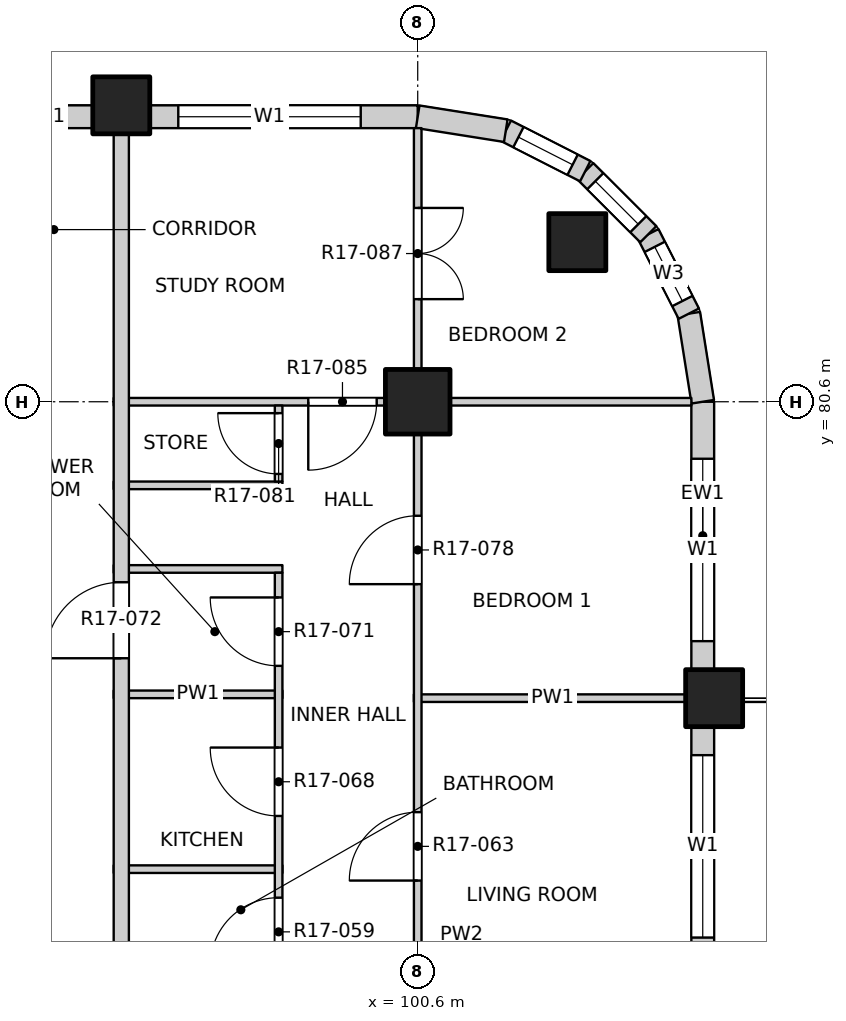
"""IFC4 building model, lengths in metres.
Left out: names, types, materials, properties, quantities, classifications, styles, units other than length and angle.
Written with IfcOpenShell. Run it as: python <this file> out.ifc"""

import sys

from ifc_helpers import new_model, si_unit, direction, frame, frame_2d, origin, origin_2d, place, context, subcontext, project, spatial, rectangle, extrude, element, fill, save


model = new_model("IFC4")
c1 = context("Model", 3, precision=1e-05, world=origin(), true_north=direction((0.0, 1.0)))
c2 = subcontext(c1, "Body", "Model", "MODEL_VIEW")
j1 = project(units=[si_unit("LENGTHUNIT", "METRE"), si_unit("PLANEANGLEUNIT", "RADIAN")], contexts=[c1])
p1 = place(None, origin())
s1 = spatial("IfcSite", under=j1, at=p1, CompositionType="ELEMENT")
p2 = place(p1, origin())
s2 = spatial("IfcBuilding", under=s1, at=p2, CompositionType="ELEMENT")
p3 = place(p2, frame((0.0, 0.0, 179.2)))
s3 = spatial("IfcBuildingStorey", under=s2, at=p3, CompositionType="ELEMENT", Elevation=179.2)
for number, where, z_axis, x_axis in (
    (1, (102.7, 82.7, -0.3), (0.0, 0.0, 1.0), (1.0, 0.0, 0.0)),
    (2, (104.5, 76.7, -0.3), (0.0, 0.0, 1.0), (1.0, 0.0, 0.0)),
    (3, (96.7, 84.5, -0.3), (0.0, 0.0, 1.0), (1.0, 0.0, 0.0)),
):
    element("IfcColumn", number, at=place(p3, frame(where, z_axis=z_axis, x_axis=x_axis)), inside=s3, PredefinedType="COLUMN", context=c2, shape_type="SweptSolid", body=[
        extrude(rectangle(XDim=0.75, YDim=0.75, at=origin_2d()), origin(), (0.0, 0.0, 1.0), 3.45),
    ])
p4 = place(p3, frame((100.6, 80.6, -0.3), z_axis=(0.0, 0.0, 1.0), x_axis=(1.0, 0.0, 0.0)))
e4 = element("IfcColumn", 4, at=p4, inside=s3, PredefinedType="COLUMN", context=c2, shape_type="SweptSolid", body=[
    extrude(rectangle(XDim=0.85, YDim=0.85, at=origin_2d()), origin(), (0.0, 0.0, 1.0), 3.45),
])
p5 = place(p3, frame((104.35, 69.275, 0.0), z_axis=(0.0, 0.0, 1.0), x_axis=(0.0, 1.0, 0.0)))
e5 = element("IfcWall", 5, at=p5, inside=s3, PredefinedType="SOLIDWALL", context=c2, shape_type="SweptSolid", body=[
    extrude(rectangle(XDim=7.05, YDim=0.3, at=frame_2d((3.525, 0.0))), origin(), (0.0, 0.0, 1.0), 2.7),
])
p6 = place(p5, frame((0.675, 0.0, 0.0)))
e6 = element("IfcOpeningElement", 6, at=p6, cuts=e5, PredefinedType="OPENING", context=c2, shape_type="SweptSolid", body=[
    extrude(rectangle(XDim=1.8, YDim=2.4, at=frame_2d((0.9, 1.2))), frame((0.0, 0.16, 0.0), z_axis=(0.0, -1.0, 0.0), x_axis=(1.0, 0.0, 0.0)), (0.0, 0.0, 1.0), 0.32),
])
p7 = place(p5, frame((4.275, 0.0, 0.9)))
e7 = element("IfcOpeningElement", 7, at=p7, cuts=e5, PredefinedType="OPENING", context=c2, shape_type="SweptSolid", body=[
    extrude(rectangle(XDim=2.4, YDim=1.8, at=frame_2d((1.2, 0.9))), frame((0.0, 0.16, 0.0), z_axis=(0.0, -1.0, 0.0), x_axis=(1.0, 0.0, 0.0)), (0.0, 0.0, 1.0), 0.32),
])
p8 = place(p3, frame((104.35, 77.075, 0.0), z_axis=(0.0, 0.0, 1.0), x_axis=(0.0, 1.0, 0.0)))
e8 = element("IfcWall", 8, at=p8, inside=s3, PredefinedType="SOLIDWALL", context=c2, shape_type="SweptSolid", body=[
    extrude(rectangle(XDim=3.525, YDim=0.3, at=frame_2d((1.763, 0.0))), origin(), (0.0, 0.0, 1.0), 2.7),
])
p9 = place(p8, frame((0.375, 0.0, 0.9)))
e9 = element("IfcOpeningElement", 9, at=p9, cuts=e8, PredefinedType="OPENING", context=c2, shape_type="SweptSolid", body=[
    extrude(rectangle(XDim=2.4, YDim=1.8, at=frame_2d((1.2, 0.9))), frame((0.0, 0.16, 0.0), z_axis=(0.0, -1.0, 0.0), x_axis=(1.0, 0.0, 0.0)), (0.0, 0.0, 1.0), 0.32),
])
p10 = place(p3, frame((95.025, 84.35, 0.0), z_axis=(0.0, 0.0, 1.0), x_axis=(1.0, 0.0, 0.0)))
e10 = element("IfcWall", 10, at=p10, inside=s3, PredefinedType="SOLIDWALL", context=c2, shape_type="SweptSolid", body=[
    extrude(rectangle(XDim=1.3, YDim=0.3, at=frame_2d((0.65, 0.0))), origin(), (0.0, 0.0, 1.0), 2.7),
])
p11 = place(p3, frame((97.075, 84.35, 0.0), z_axis=(0.0, 0.0, 1.0), x_axis=(1.0, 0.0, 0.0)))
e11 = element("IfcWall", 11, at=p11, inside=s3, PredefinedType="SOLIDWALL", context=c2, shape_type="SweptSolid", body=[
    extrude(rectangle(XDim=3.525, YDim=0.3, at=frame_2d((1.763, 0.0))), origin(), (0.0, 0.0, 1.0), 2.7),
])
p12 = place(p11, frame((0.375, 0.0, 0.9)))
e12 = element("IfcOpeningElement", 12, at=p12, cuts=e11, PredefinedType="OPENING", context=c2, shape_type="SweptSolid", body=[
    extrude(rectangle(XDim=2.4, YDim=1.8, at=frame_2d((1.2, 0.9))), frame((0.0, 0.16, 0.0), z_axis=(0.0, -1.0, 0.0), x_axis=(1.0, 0.0, 0.0)), (0.0, 0.0, 1.0), 0.32),
])
p13 = place(p3, frame((104.35, 80.6, 0.0), z_axis=(0.0, 0.0, 1.0), x_axis=(-0.156496880861, 0.987678452879, 0.0)))
e13 = element("IfcWall", 13, at=p13, inside=s3, PredefinedType="SOLIDWALL", context=c2, shape_type="SweptSolid", body=[
    extrude(rectangle(XDim=1.173, YDim=0.3, at=frame_2d((0.586, 0.0))), origin(), (0.0, 0.0, 1.0), 2.7),
])
p14 = place(p3, frame((104.167, 81.759, 0.0), z_axis=(0.0, 0.0, 1.0), x_axis=(-0.454025524128, 0.890988677504, 0.0)))
e14 = element("IfcWall", 14, at=p14, inside=s3, PredefinedType="SOLIDWALL", context=c2, shape_type="SweptSolid", body=[
    extrude(rectangle(XDim=1.173, YDim=0.3, at=frame_2d((0.587, 0.0))), origin(), (0.0, 0.0, 1.0), 2.7),
])
p15 = place(p14, frame((0.187, 0.0, 0.9)))
e15 = element("IfcOpeningElement", 15, at=p15, cuts=e14, PredefinedType="OPENING", context=c2, shape_type="SweptSolid", body=[
    extrude(rectangle(XDim=0.8, YDim=1.2, at=frame_2d((0.4, 0.6))), frame((0.0, 0.16, 0.0), z_axis=(0.0, -1.0, 0.0), x_axis=(1.0, 0.0, 0.0)), (0.0, 0.0, 1.0), 0.32),
])
p16 = place(p3, frame((103.634, 82.804, 0.0), z_axis=(0.0, 0.0, 1.0), x_axis=(-0.707106781187, 0.707106781187, 0.0)))
e16 = element("IfcWall", 16, at=p16, inside=s3, PredefinedType="SOLIDWALL", context=c2, shape_type="SweptSolid", body=[
    extrude(rectangle(XDim=1.173, YDim=0.3, at=frame_2d((0.586, 0.0))), origin(), (0.0, 0.0, 1.0), 2.7),
])
p17 = place(p16, frame((0.187, 0.0, 0.9)))
e17 = element("IfcOpeningElement", 17, at=p17, cuts=e16, PredefinedType="OPENING", context=c2, shape_type="SweptSolid", body=[
    extrude(rectangle(XDim=0.8, YDim=1.2, at=frame_2d((0.4, 0.6))), frame((0.0, 0.16, 0.0), z_axis=(0.0, -1.0, 0.0), x_axis=(1.0, 0.0, 0.0)), (0.0, 0.0, 1.0), 0.32),
])
p18 = place(p3, frame((102.804, 83.634, 0.0), z_axis=(0.0, 0.0, 1.0), x_axis=(-0.890988677504, 0.454025524128, 0.0)))
e18 = element("IfcWall", 18, at=p18, inside=s3, PredefinedType="SOLIDWALL", context=c2, shape_type="SweptSolid", body=[
    extrude(rectangle(XDim=1.173, YDim=0.3, at=frame_2d((0.587, 0.0))), origin(), (0.0, 0.0, 1.0), 2.7),
])
p19 = place(p18, frame((0.187, 0.0, 0.9)))
e19 = element("IfcOpeningElement", 19, at=p19, cuts=e18, PredefinedType="OPENING", context=c2, shape_type="SweptSolid", body=[
    extrude(rectangle(XDim=0.8, YDim=1.2, at=frame_2d((0.4, 0.6))), frame((0.0, 0.16, 0.0), z_axis=(0.0, -1.0, 0.0), x_axis=(1.0, 0.0, 0.0)), (0.0, 0.0, 1.0), 0.32),
])
p20 = place(p3, frame((101.759, 84.167, 0.0), z_axis=(0.0, 0.0, 1.0), x_axis=(-0.987678452879, 0.156496880861, 0.0)))
e20 = element("IfcWall", 20, at=p20, inside=s3, PredefinedType="SOLIDWALL", context=c2, shape_type="SweptSolid", body=[
    extrude(rectangle(XDim=1.173, YDim=0.3, at=frame_2d((0.586, 0.0))), origin(), (0.0, 0.0, 1.0), 2.7),
])
p21 = place(p3, frame((96.6, 74.45, 0.0), z_axis=(0.0, 0.0, 1.0), x_axis=(1.0, 0.0, 0.0)))
e21 = element("IfcWall", 21, at=p21, inside=s3, PredefinedType="PARTITIONING", context=c2, shape_type="SweptSolid", body=[
    extrude(rectangle(XDim=2.22, YDim=0.1, at=frame_2d((1.11, 0.0))), origin(), (0.0, 0.0, 1.0), 3.15),
])
p22 = place(p3, frame((100.55, 76.7, 0.0), z_axis=(0.0, 0.0, 1.0), x_axis=(1.0, 0.0, 0.0)))
e22 = element("IfcWall", 22, at=p22, inside=s3, PredefinedType="PARTITIONING", context=c2, shape_type="SweptSolid", body=[
    extrude(rectangle(XDim=3.65, YDim=0.1, at=frame_2d((1.825, 0.0))), origin(), (0.0, 0.0, 1.0), 2.55),
])
p23 = place(p3, frame((96.6, 76.75, 0.0), z_axis=(0.0, 0.0, 1.0), x_axis=(1.0, 0.0, 0.0)))
e23 = element("IfcWall", 23, at=p23, inside=s3, PredefinedType="PARTITIONING", context=c2, shape_type="SweptSolid", body=[
    extrude(rectangle(XDim=2.22, YDim=0.1, at=frame_2d((1.11, 0.0))), origin(), (0.0, 0.0, 1.0), 2.55),
])
for number, where, z_axis, x_axis in (
    (24, (96.6, 78.4, 0.0), (0.0, 0.0, 1.0), (1.0, 0.0, 0.0)),
    (25, (96.6, 79.5, 0.0), (0.0, 0.0, 1.0), (1.0, 0.0, 0.0)),
):
    element("IfcWall", number, at=place(p3, frame(where, z_axis=z_axis, x_axis=x_axis)), inside=s3, PredefinedType="PARTITIONING", context=c2, shape_type="SweptSolid", body=[
        extrude(rectangle(XDim=2.22, YDim=0.1, at=frame_2d((1.11, 0.0))), origin(), (0.0, 0.0, 1.0), 3.15),
    ])
p24 = place(p3, frame((96.6, 80.6, 0.0), z_axis=(0.0, 0.0, 1.0), x_axis=(1.0, 0.0, 0.0)))
e26 = element("IfcWall", 26, at=p24, inside=s3, PredefinedType="PARTITIONING", context=c2, shape_type="SweptSolid", body=[
    extrude(rectangle(XDim=7.6, YDim=0.1, at=frame_2d((3.8, 0.0))), origin(), (0.0, 0.0, 1.0), 3.15),
])
p25 = place(p24, frame((2.56, 0.0, 0.0)))
e27 = element("IfcOpeningElement", 27, at=p25, cuts=e26, PredefinedType="OPENING", context=c2, shape_type="SweptSolid", body=[
    extrude(rectangle(XDim=0.9, YDim=2.1, at=frame_2d((0.45, 1.05))), frame((0.0, 0.06, 0.0), z_axis=(0.0, -1.0, 0.0), x_axis=(1.0, 0.0, 0.0)), (0.0, 0.0, 1.0), 0.12),
])
p26 = place(p3, frame((96.7, 49.5, 0.0), z_axis=(0.0, 0.0, 1.0), x_axis=(0.0, 1.0, 0.0)))
e28 = element("IfcWall", 28, at=p26, inside=s3, PredefinedType="PARTITIONING", context=c2, shape_type="SweptSolid", body=[
    extrude(rectangle(XDim=34.7, YDim=0.2, at=frame_2d((17.35, 0.0))), origin(), (0.0, 0.0, 1.0), 3.15),
])
p27 = place(p26, frame((6.875, 0.0, 0.0)))
e29 = element("IfcOpeningElement", 29, at=p27, cuts=e28, PredefinedType="OPENING", context=c2, shape_type="SweptSolid", body=[
    extrude(rectangle(XDim=1.0, YDim=2.1, at=frame_2d((0.5, 1.05))), frame((0.0, 0.11, 0.0), z_axis=(0.0, -1.0, 0.0), x_axis=(1.0, 0.0, 0.0)), (0.0, 0.0, 1.0), 0.22),
])
p28 = place(p26, frame((21.775, 0.0, 0.0)))
e30 = element("IfcOpeningElement", 30, at=p28, cuts=e28, PredefinedType="OPENING", context=c2, shape_type="SweptSolid", body=[
    extrude(rectangle(XDim=1.0, YDim=2.1, at=frame_2d((0.5, 1.05))), frame((0.0, 0.11, 0.0), z_axis=(0.0, -1.0, 0.0), x_axis=(1.0, 0.0, 0.0)), (0.0, 0.0, 1.0), 0.22),
])
p29 = place(p26, frame((27.725, 0.0, 0.0)))
e31 = element("IfcOpeningElement", 31, at=p29, cuts=e28, PredefinedType="OPENING", context=c2, shape_type="SweptSolid", body=[
    extrude(rectangle(XDim=1.0, YDim=2.1, at=frame_2d((0.5, 1.05))), frame((0.0, 0.11, 0.0), z_axis=(0.0, -1.0, 0.0), x_axis=(1.0, 0.0, 0.0)), (0.0, 0.0, 1.0), 0.22),
])
p30 = place(p3, frame((98.77, 71.15, 0.0), z_axis=(0.0, 0.0, 1.0), x_axis=(0.0, 1.0, 0.0)))
e32 = element("IfcWall", 32, at=p30, inside=s3, PredefinedType="PARTITIONING", context=c2, shape_type="SweptSolid", body=[
    extrude(rectangle(XDim=7.2, YDim=0.1, at=frame_2d((3.6, 0.0))), origin(), (0.0, 0.0, 1.0), 3.15),
])
p31 = place(p30, frame((0.4, 0.0, 0.0)))
e33 = element("IfcOpeningElement", 33, at=p31, cuts=e32, PredefinedType="OPENING", context=c2, shape_type="SweptSolid", body=[
    extrude(rectangle(XDim=0.8, YDim=2.1, at=frame_2d((0.4, 1.05))), frame((0.0, 0.06, 0.0), z_axis=(0.0, -1.0, 0.0), x_axis=(1.0, 0.0, 0.0)), (0.0, 0.0, 1.0), 0.12),
])
p32 = place(p30, frame((2.025, 0.0, 0.0)))
e34 = element("IfcOpeningElement", 34, at=p32, cuts=e32, PredefinedType="OPENING", context=c2, shape_type="SweptSolid", body=[
    extrude(rectangle(XDim=0.9, YDim=2.1, at=frame_2d((0.45, 1.05))), frame((0.0, 0.06, 0.0), z_axis=(0.0, -1.0, 0.0), x_axis=(1.0, 0.0, 0.0)), (0.0, 0.0, 1.0), 0.12),
])
p33 = place(p30, frame((4.0, 0.0, 0.0)))
e35 = element("IfcOpeningElement", 35, at=p33, cuts=e32, PredefinedType="OPENING", context=c2, shape_type="SweptSolid", body=[
    extrude(rectangle(XDim=0.9, YDim=2.1, at=frame_2d((0.45, 1.05))), frame((0.0, 0.06, 0.0), z_axis=(0.0, -1.0, 0.0), x_axis=(1.0, 0.0, 0.0)), (0.0, 0.0, 1.0), 0.12),
])
p34 = place(p30, frame((5.975, 0.0, 0.0)))
e36 = element("IfcOpeningElement", 36, at=p34, cuts=e32, PredefinedType="OPENING", context=c2, shape_type="SweptSolid", body=[
    extrude(rectangle(XDim=0.9, YDim=2.1, at=frame_2d((0.45, 1.05))), frame((0.0, 0.06, 0.0), z_axis=(0.0, -1.0, 0.0), x_axis=(1.0, 0.0, 0.0)), (0.0, 0.0, 1.0), 0.12),
])
p35 = place(p3, frame((98.77, 79.55, 0.0), z_axis=(0.0, 0.0, 1.0), x_axis=(0.0, 1.0, 0.0)))
e37 = element("IfcWall", 37, at=p35, inside=s3, PredefinedType="PARTITIONING", context=c2, shape_type="SweptSolid", body=[
    extrude(rectangle(XDim=1.0, YDim=0.1, at=frame_2d((0.5, 0.0))), origin(), (0.0, 0.0, 1.0), 3.15),
])
p36 = place(p35, frame((0.1, 0.0, 0.0)))
e38 = element("IfcOpeningElement", 38, at=p36, cuts=e37, PredefinedType="OPENING", context=c2, shape_type="SweptSolid", body=[
    extrude(rectangle(XDim=0.8, YDim=2.1, at=frame_2d((0.4, 1.05))), frame((0.0, 0.06, 0.0), z_axis=(0.0, -1.0, 0.0), x_axis=(1.0, 0.0, 0.0)), (0.0, 0.0, 1.0), 0.12),
])
p37 = place(p3, frame((100.6, 45.8, 0.0), z_axis=(0.0, 0.0, 1.0), x_axis=(0.0, 1.0, 0.0)))
e39 = element("IfcWall", 39, at=p37, inside=s3, PredefinedType="PARTITIONING", context=c2, shape_type="SweptSolid", body=[
    extrude(rectangle(XDim=38.4, YDim=0.1, at=frame_2d((19.2, 0.0))), origin(), (0.0, 0.0, 1.0), 3.15),
])
p38 = place(p37, frame((1.05, 0.0, 0.0)))
e40 = element("IfcOpeningElement", 40, at=p38, cuts=e39, PredefinedType="OPENING", context=c2, shape_type="SweptSolid", body=[
    extrude(rectangle(XDim=1.2, YDim=2.1, at=frame_2d((0.6, 1.05))), frame((0.0, 0.06, 0.0), z_axis=(0.0, -1.0, 0.0), x_axis=(1.0, 0.0, 0.0)), (0.0, 0.0, 1.0), 0.12),
])
p39 = place(p37, frame((5.1, 0.0, 0.0)))
e41 = element("IfcOpeningElement", 41, at=p39, cuts=e39, PredefinedType="OPENING", context=c2, shape_type="SweptSolid", body=[
    extrude(rectangle(XDim=0.9, YDim=2.1, at=frame_2d((0.45, 1.05))), frame((0.0, 0.06, 0.0), z_axis=(0.0, -1.0, 0.0), x_axis=(1.0, 0.0, 0.0)), (0.0, 0.0, 1.0), 0.12),
])
p40 = place(p37, frame((9.0, 0.0, 0.0)))
e42 = element("IfcOpeningElement", 42, at=p40, cuts=e39, PredefinedType="OPENING", context=c2, shape_type="SweptSolid", body=[
    extrude(rectangle(XDim=0.9, YDim=2.1, at=frame_2d((0.45, 1.05))), frame((0.0, 0.06, 0.0), z_axis=(0.0, -1.0, 0.0), x_axis=(1.0, 0.0, 0.0)), (0.0, 0.0, 1.0), 0.12),
])
p41 = place(p37, frame((12.9, 0.0, 0.0)))
e43 = element("IfcOpeningElement", 43, at=p41, cuts=e39, PredefinedType="OPENING", context=c2, shape_type="SweptSolid", body=[
    extrude(rectangle(XDim=0.9, YDim=2.1, at=frame_2d((0.45, 1.05))), frame((0.0, 0.06, 0.0), z_axis=(0.0, -1.0, 0.0), x_axis=(1.0, 0.0, 0.0)), (0.0, 0.0, 1.0), 0.12),
])
p42 = place(p37, frame((19.725, 0.0, 0.0)))
e44 = element("IfcOpeningElement", 44, at=p42, cuts=e39, PredefinedType="OPENING", context=c2, shape_type="SweptSolid", body=[
    extrude(rectangle(XDim=1.2, YDim=2.1, at=frame_2d((0.6, 1.05))), frame((0.0, 0.06, 0.0), z_axis=(0.0, -1.0, 0.0), x_axis=(1.0, 0.0, 0.0)), (0.0, 0.0, 1.0), 0.12),
])
p43 = place(p37, frame((24.6, 0.0, 0.0)))
e45 = element("IfcOpeningElement", 45, at=p43, cuts=e39, PredefinedType="OPENING", context=c2, shape_type="SweptSolid", body=[
    extrude(rectangle(XDim=0.9, YDim=2.1, at=frame_2d((0.45, 1.05))), frame((0.0, 0.06, 0.0), z_axis=(0.0, -1.0, 0.0), x_axis=(1.0, 0.0, 0.0)), (0.0, 0.0, 1.0), 0.12),
])
p44 = place(p37, frame((28.5, 0.0, 0.0)))
e46 = element("IfcOpeningElement", 46, at=p44, cuts=e39, PredefinedType="OPENING", context=c2, shape_type="SweptSolid", body=[
    extrude(rectangle(XDim=0.9, YDim=2.1, at=frame_2d((0.45, 1.05))), frame((0.0, 0.06, 0.0), z_axis=(0.0, -1.0, 0.0), x_axis=(1.0, 0.0, 0.0)), (0.0, 0.0, 1.0), 0.12),
])
p45 = place(p37, frame((32.4, 0.0, 0.0)))
e47 = element("IfcOpeningElement", 47, at=p45, cuts=e39, PredefinedType="OPENING", context=c2, shape_type="SweptSolid", body=[
    extrude(rectangle(XDim=0.9, YDim=2.1, at=frame_2d((0.45, 1.05))), frame((0.0, 0.06, 0.0), z_axis=(0.0, -1.0, 0.0), x_axis=(1.0, 0.0, 0.0)), (0.0, 0.0, 1.0), 0.12),
])
p46 = place(p37, frame((36.15, 0.0, 0.0)))
e48 = element("IfcOpeningElement", 48, at=p46, cuts=e39, PredefinedType="OPENING", context=c2, shape_type="SweptSolid", body=[
    extrude(rectangle(XDim=1.2, YDim=2.1, at=frame_2d((0.6, 1.05))), frame((0.0, 0.06, 0.0), z_axis=(0.0, -1.0, 0.0), x_axis=(1.0, 0.0, 0.0)), (0.0, 0.0, 1.0), 0.12),
])
p47 = place(p7, origin())
e49 = element("IfcWindow", 49, at=p47, inside=s3, PartitioningType="DOUBLE_PANEL_VERTICAL", PredefinedType="WINDOW", context=c2, shape_type="SweptSolid", body=[
    extrude(rectangle(XDim=2.4, YDim=1.8, at=frame_2d((1.2, 0.9))), frame((0.0, 0.03, 0.0), z_axis=(0.0, -1.0, 0.0), x_axis=(1.0, 0.0, 0.0)), (0.0, 0.0, 1.0), 0.06),
])
fill(e7, e49)
p48 = place(p9, origin())
e50 = element("IfcWindow", 50, at=p48, inside=s3, PartitioningType="DOUBLE_PANEL_VERTICAL", PredefinedType="WINDOW", context=c2, shape_type="SweptSolid", body=[
    extrude(rectangle(XDim=2.4, YDim=1.8, at=frame_2d((1.2, 0.9))), frame((0.0, 0.03, 0.0), z_axis=(0.0, -1.0, 0.0), x_axis=(1.0, 0.0, 0.0)), (0.0, 0.0, 1.0), 0.06),
])
fill(e9, e50)
p49 = place(p12, origin())
e51 = element("IfcWindow", 51, at=p49, inside=s3, PartitioningType="DOUBLE_PANEL_VERTICAL", PredefinedType="WINDOW", context=c2, shape_type="SweptSolid", body=[
    extrude(rectangle(XDim=2.4, YDim=1.8, at=frame_2d((1.2, 0.9))), frame((0.0, 0.03, 0.0), z_axis=(0.0, -1.0, 0.0), x_axis=(1.0, 0.0, 0.0)), (0.0, 0.0, 1.0), 0.06),
])
fill(e12, e51)
p50 = place(p15, origin())
e52 = element("IfcWindow", 52, at=p50, inside=s3, PartitioningType="SINGLE_PANEL", PredefinedType="WINDOW", context=c2, shape_type="SweptSolid", body=[
    extrude(rectangle(XDim=0.8, YDim=1.2, at=frame_2d((0.4, 0.6))), frame((0.0, 0.03, 0.0), z_axis=(0.0, -1.0, 0.0), x_axis=(1.0, 0.0, 0.0)), (0.0, 0.0, 1.0), 0.06),
])
fill(e15, e52)
p51 = place(p17, origin())
e53 = element("IfcWindow", 53, at=p51, inside=s3, PartitioningType="SINGLE_PANEL", PredefinedType="WINDOW", context=c2, shape_type="SweptSolid", body=[
    extrude(rectangle(XDim=0.8, YDim=1.2, at=frame_2d((0.4, 0.6))), frame((0.0, 0.03, 0.0), z_axis=(0.0, -1.0, 0.0), x_axis=(1.0, 0.0, 0.0)), (0.0, 0.0, 1.0), 0.06),
])
fill(e17, e53)
p52 = place(p19, origin())
e54 = element("IfcWindow", 54, at=p52, inside=s3, PartitioningType="SINGLE_PANEL", PredefinedType="WINDOW", context=c2, shape_type="SweptSolid", body=[
    extrude(rectangle(XDim=0.8, YDim=1.2, at=frame_2d((0.4, 0.6))), frame((0.0, 0.03, 0.0), z_axis=(0.0, -1.0, 0.0), x_axis=(1.0, 0.0, 0.0)), (0.0, 0.0, 1.0), 0.06),
])
fill(e19, e54)
p53 = place(p32, origin())
e55 = element("IfcDoor", 55, at=p53, inside=s3, OperationType="SINGLE_SWING_LEFT", PredefinedType="DOOR", context=c2, shape_type="SweptSolid", body=[
    extrude(rectangle(XDim=0.9, YDim=2.1, at=frame_2d((0.45, 1.05))), frame((0.0, 0.025, 0.0), z_axis=(0.0, -1.0, 0.0), x_axis=(1.0, 0.0, 0.0)), (0.0, 0.0, 1.0), 0.05),
])
fill(e34, e55)
p54 = place(p44, origin())
e56 = element("IfcDoor", 56, at=p54, inside=s3, OperationType="SINGLE_SWING_LEFT", PredefinedType="DOOR", context=c2, shape_type="SweptSolid", body=[
    extrude(rectangle(XDim=0.9, YDim=2.1, at=frame_2d((0.45, 1.05))), frame((0.0, 0.025, 0.0), z_axis=(0.0, -1.0, 0.0), x_axis=(1.0, 0.0, 0.0)), (0.0, 0.0, 1.0), 0.05),
])
fill(e46, e56)
p55 = place(p33, origin())
e57 = element("IfcDoor", 57, at=p55, inside=s3, OperationType="SINGLE_SWING_RIGHT", PredefinedType="DOOR", context=c2, shape_type="SweptSolid", body=[
    extrude(rectangle(XDim=0.9, YDim=2.1, at=frame_2d((0.45, 1.05))), frame((0.0, 0.025, 0.0), z_axis=(0.0, -1.0, 0.0), x_axis=(1.0, 0.0, 0.0)), (0.0, 0.0, 1.0), 0.05),
])
fill(e35, e57)
p56 = place(p34, origin())
e58 = element("IfcDoor", 58, at=p56, inside=s3, OperationType="SINGLE_SWING_RIGHT", PredefinedType="DOOR", context=c2, shape_type="SweptSolid", body=[
    extrude(rectangle(XDim=0.9, YDim=2.1, at=frame_2d((0.45, 1.05))), frame((0.0, 0.025, 0.0), z_axis=(0.0, -1.0, 0.0), x_axis=(1.0, 0.0, 0.0)), (0.0, 0.0, 1.0), 0.05),
])
fill(e36, e58)
p57 = place(p29, origin())
e59 = element("IfcDoor", 59, at=p57, inside=s3, OperationType="SINGLE_SWING_RIGHT", PredefinedType="DOOR", context=c2, shape_type="SweptSolid", body=[
    extrude(rectangle(XDim=1.0, YDim=2.1, at=frame_2d((0.5, 1.05))), frame((0.0, 0.025, 0.0), z_axis=(0.0, -1.0, 0.0), x_axis=(1.0, 0.0, 0.0)), (0.0, 0.0, 1.0), 0.05),
])
fill(e31, e59)
p58 = place(p45, origin())
e60 = element("IfcDoor", 60, at=p58, inside=s3, OperationType="SINGLE_SWING_LEFT", PredefinedType="DOOR", context=c2, shape_type="SweptSolid", body=[
    extrude(rectangle(XDim=0.9, YDim=2.1, at=frame_2d((0.45, 1.05))), frame((0.0, 0.025, 0.0), z_axis=(0.0, -1.0, 0.0), x_axis=(1.0, 0.0, 0.0)), (0.0, 0.0, 1.0), 0.05),
])
fill(e47, e60)
p59 = place(p36, origin())
e61 = element("IfcDoor", 61, at=p59, inside=s3, OperationType="SINGLE_SWING_RIGHT", PredefinedType="DOOR", context=c2, shape_type="SweptSolid", body=[
    extrude(rectangle(XDim=0.8, YDim=2.1, at=frame_2d((0.4, 1.05))), frame((0.0, 0.025, 0.0), z_axis=(0.0, -1.0, 0.0), x_axis=(1.0, 0.0, 0.0)), (0.0, 0.0, 1.0), 0.05),
])
fill(e38, e61)
p60 = place(p25, origin())
e62 = element("IfcDoor", 62, at=p60, inside=s3, OperationType="SINGLE_SWING_RIGHT", PredefinedType="DOOR", context=c2, shape_type="SweptSolid", body=[
    extrude(rectangle(XDim=0.9, YDim=2.1, at=frame_2d((0.45, 1.05))), frame((0.0, 0.025, 0.0), z_axis=(0.0, -1.0, 0.0), x_axis=(1.0, 0.0, 0.0)), (0.0, 0.0, 1.0), 0.05),
])
fill(e27, e62)
p61 = place(p46, origin())
e63 = element("IfcDoor", 63, at=p61, inside=s3, OperationType="DOUBLE_DOOR_SINGLE_SWING", PredefinedType="DOOR", context=c2, shape_type="SweptSolid", body=[
    extrude(rectangle(XDim=1.2, YDim=2.1, at=frame_2d((0.6, 1.05))), frame((0.0, 0.025, 0.0), z_axis=(0.0, -1.0, 0.0), x_axis=(1.0, 0.0, 0.0)), (0.0, 0.0, 1.0), 0.05),
])
fill(e48, e63)
save(model, sys.argv[1])
